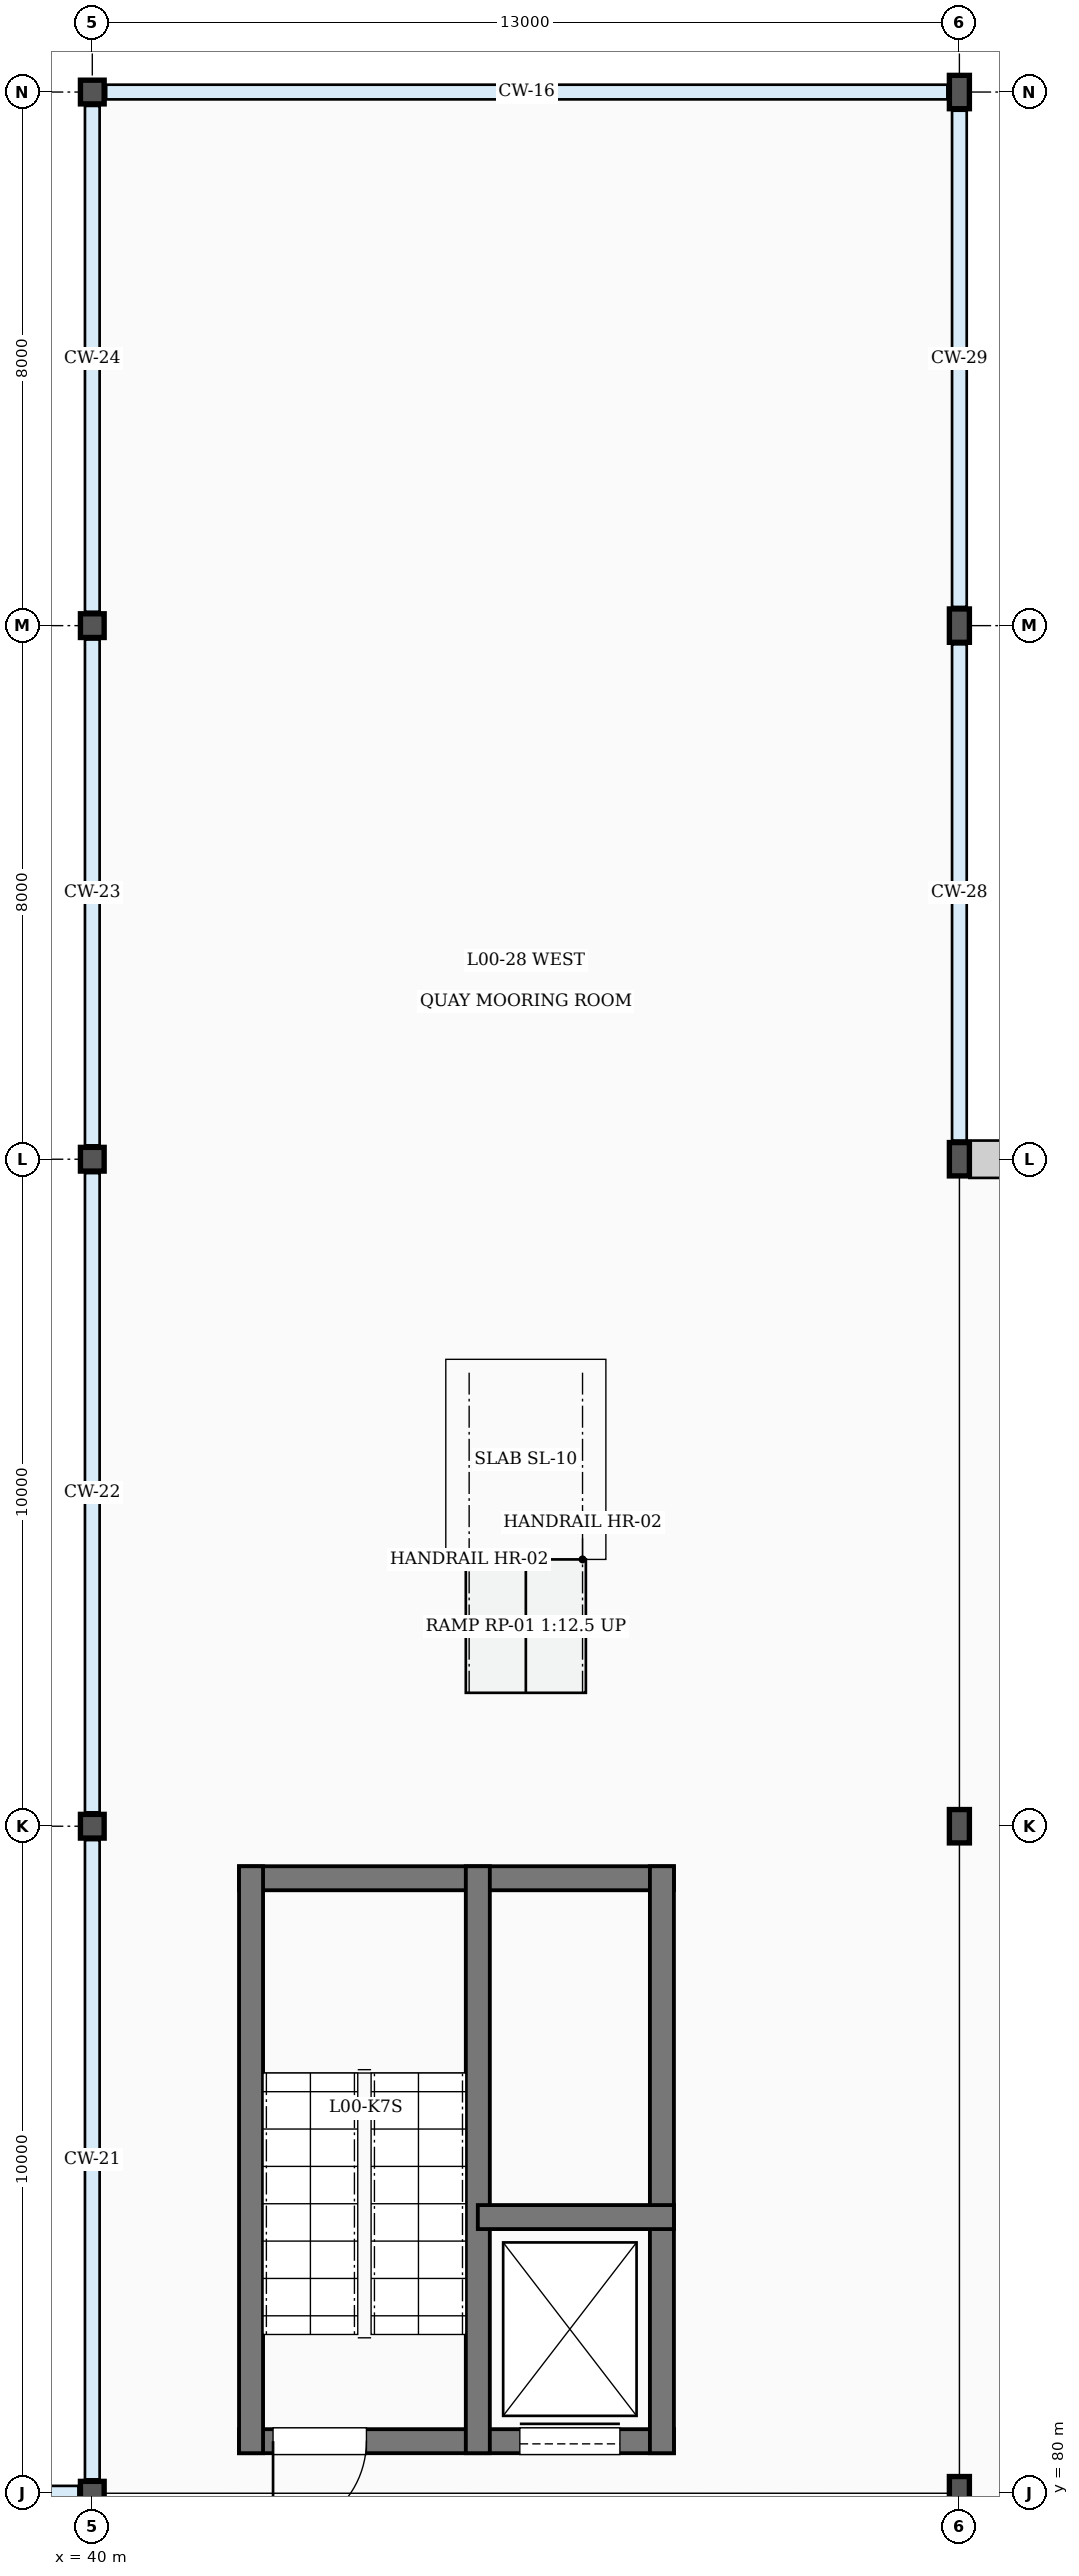
"""IFC4 building model, lengths in metres.
Left out: names, types, materials, properties, quantities, classifications, styles, units other than length and angle.
Written with IfcOpenShell. Run it as: python <this file> out.ifc"""

import sys

from ifc_helpers import new_model, si_unit, direction, frame, frame_2d, origin, origin_2d, place, context, subcontext, project, spatial, rectangle, hollow_circle, i_section, extrude, element, fill, save


model = new_model("IFC4")
c1 = context("Model", 3, precision=1e-05, world=origin(), true_north=direction((0.0, 1.0)))
c2 = subcontext(c1, "Body", "Model", "MODEL_VIEW")
j1 = project(units=[si_unit("LENGTHUNIT", "METRE"), si_unit("PLANEANGLEUNIT", "RADIAN")], contexts=[c1])
p1 = place(None, origin())
s1 = spatial("IfcSite", under=j1, at=p1, CompositionType="ELEMENT")
p2 = place(p1, origin())
s2 = spatial("IfcBuilding", under=s1, at=p2, CompositionType="ELEMENT")
p3 = place(p2, origin())
s3 = spatial("IfcBuildingStorey", under=s2, at=p3, CompositionType="ELEMENT", Elevation=0.0)
for number, where, z_axis, x_axis in (
    (1, (40.0, 80.0, 0.0), (0.0, 0.0, 1.0), (1.0, 0.0, 0.0)),
    (2, (40.0, 90.0, 0.0), (0.0, 0.0, 1.0), (1.0, 0.0, 0.0)),
    (3, (40.0, 100.0, 0.0), (0.0, 0.0, 1.0), (1.0, 0.0, 0.0)),
    (4, (40.0, 108.0, 0.0), (0.0, 0.0, 1.0), (1.0, 0.0, 0.0)),
    (5, (40.0, 116.0, 0.0), (0.0, 0.0, 1.0), (1.0, 0.0, 0.0)),
):
    element("IfcColumn", number, at=place(p3, frame(where, z_axis=z_axis, x_axis=x_axis)), inside=s3, PredefinedType="COLUMN", context=c2, shape_type="SweptSolid", body=[
        extrude(hollow_circle(Radius=0.178, WallThickness=0.016, at=origin_2d()), origin(), (0.0, 0.0, 1.0), 5.4),
    ])
for number, where, z_axis, x_axis in (
    (6, (53.0, 80.0, 0.0), (0.0, 0.0, 1.0), (1.0, 0.0, 0.0)),
    (7, (53.0, 90.0, 0.0), (0.0, 0.0, 1.0), (1.0, 0.0, 0.0)),
    (8, (53.0, 100.0, 0.0), (0.0, 0.0, 1.0), (1.0, 0.0, 0.0)),
    (9, (53.0, 108.0, 0.0), (0.0, 0.0, 1.0), (1.0, 0.0, 0.0)),
    (10, (53.0, 116.0, 0.0), (0.0, 0.0, 1.0), (1.0, 0.0, 0.0)),
):
    element("IfcColumn", number, at=place(p3, frame(where, z_axis=z_axis, x_axis=x_axis)), inside=s3, PredefinedType="COLUMN", context=c2, shape_type="SweptSolid", body=[
        extrude(i_section(OverallWidth=0.3, OverallDepth=0.5, WebThickness=0.014, FlangeThickness=0.028, FilletRadius=0.027, at=origin_2d()), origin(), (0.0, 0.0, 1.0), 5.4),
    ])
p4 = place(p3, frame((53.15, 100.0, 0.0), z_axis=(0.0, 0.0, 1.0), x_axis=(1.0, 0.0, 0.0)))
e11 = element("IfcWall", 11, at=p4, inside=s3, PredefinedType="SOLIDWALL", context=c2, shape_type="SweptSolid", body=[
    extrude(rectangle(XDim=9.7, YDim=0.56, at=frame_2d((4.85, 0.0))), origin(), (0.0, 0.0, 1.0), 4.58),
])
p5 = place(p4, frame((3.75, 0.0, 0.0)))
e12 = element("IfcOpeningElement", 12, at=p5, cuts=e11, PredefinedType="OPENING", context=c2, shape_type="SweptSolid", body=[
    extrude(rectangle(XDim=2.2, YDim=2.45, at=frame_2d((1.1, 1.225))), frame((0.0, 0.29, 0.0), z_axis=(0.0, -1.0, 0.0), x_axis=(1.0, 0.0, 0.0)), (0.0, 0.0, 1.0), 0.58),
])
p6 = place(p3, frame((42.2, 80.78, 0.0), z_axis=(0.0, 0.0, 1.0), x_axis=(1.0, 0.0, 0.0)))
e13 = element("IfcWall", 13, at=p6, inside=s3, PredefinedType="SHEAR", context=c2, shape_type="SweptSolid", body=[
    extrude(rectangle(XDim=6.52, YDim=0.36, at=frame_2d((3.26, 0.0))), origin(), (0.0, 0.0, 1.0), 5.4),
])
p7 = place(p6, frame((0.51, 0.0, 0.0)))
e14 = element("IfcOpeningElement", 14, at=p7, cuts=e13, PredefinedType="OPENING", context=c2, shape_type="SweptSolid", body=[
    extrude(rectangle(XDim=1.4, YDim=2.35, at=frame_2d((0.7, 1.175))), frame((0.0, 0.19, 0.0), z_axis=(0.0, -1.0, 0.0), x_axis=(1.0, 0.0, 0.0)), (0.0, 0.0, 1.0), 0.38),
])
p8 = place(p6, frame((4.21, 0.0, 0.0)))
e15 = element("IfcOpeningElement", 15, at=p8, cuts=e13, PredefinedType="OPENING", context=c2, shape_type="SweptSolid", body=[
    extrude(rectangle(XDim=1.5, YDim=2.4, at=frame_2d((0.75, 1.2))), frame((0.0, 0.19, 0.0), z_axis=(0.0, -1.0, 0.0), x_axis=(1.0, 0.0, 0.0)), (0.0, 0.0, 1.0), 0.38),
])
p9 = place(p3, frame((42.2, 89.22, 0.0), z_axis=(0.0, 0.0, 1.0), x_axis=(1.0, 0.0, 0.0)))
e16 = element("IfcWall", 16, at=p9, inside=s3, PredefinedType="SHEAR", context=c2, shape_type="SweptSolid", body=[
    extrude(rectangle(XDim=6.52, YDim=0.36, at=frame_2d((3.26, 0.0))), origin(), (0.0, 0.0, 1.0), 5.4),
])
for number, where, z_axis, x_axis in (
    (17, (42.38, 80.6, 0.0), (0.0, 0.0, 1.0), (0.0, 1.0, 0.0)),
    (18, (48.54, 80.6, 0.0), (0.0, 0.0, 1.0), (0.0, 1.0, 0.0)),
    (19, (45.78, 80.6, 0.0), (0.0, 0.0, 1.0), (0.0, 1.0, 0.0)),
):
    element("IfcWall", number, at=place(p3, frame(where, z_axis=z_axis, x_axis=x_axis)), inside=s3, PredefinedType="SHEAR", context=c2, shape_type="SweptSolid", body=[
        extrude(rectangle(XDim=8.8, YDim=0.36, at=frame_2d((4.4, 0.0))), origin(), (0.0, 0.0, 1.0), 5.4),
    ])
p10 = place(p3, frame((45.78, 84.14, 0.0), z_axis=(0.0, 0.0, 1.0), x_axis=(1.0, 0.0, 0.0)))
e20 = element("IfcWall", 20, at=p10, inside=s3, PredefinedType="SHEAR", context=c2, shape_type="SweptSolid", body=[
    extrude(rectangle(XDim=2.94, YDim=0.36, at=frame_2d((1.47, 0.0))), origin(), (0.0, 0.0, 1.0), 5.4),
])
p11 = place(p7, origin())
e21 = element("IfcDoor", 21, at=p11, inside=s3, OperationType="SINGLE_SWING_LEFT", PredefinedType="DOOR", context=c2, shape_type="SweptSolid", body=[
    extrude(rectangle(XDim=1.4, YDim=2.35, at=frame_2d((0.7, 1.175))), frame((0.0, 0.025, 0.0), z_axis=(0.0, -1.0, 0.0), x_axis=(1.0, 0.0, 0.0)), (0.0, 0.0, 1.0), 0.05),
])
fill(e14, e21)
p12 = place(p8, origin())
e22 = element("IfcDoor", 22, at=p12, inside=s3, OperationType="SLIDING_TO_LEFT", PredefinedType="DOOR", context=c2, shape_type="SweptSolid", body=[
    extrude(rectangle(XDim=1.5, YDim=2.4, at=frame_2d((0.75, 1.2))), frame((0.0, 0.025, 0.0), z_axis=(0.0, -1.0, 0.0), x_axis=(1.0, 0.0, 0.0)), (0.0, 0.0, 1.0), 0.05),
])
fill(e15, e22)
save(model, sys.argv[1])
